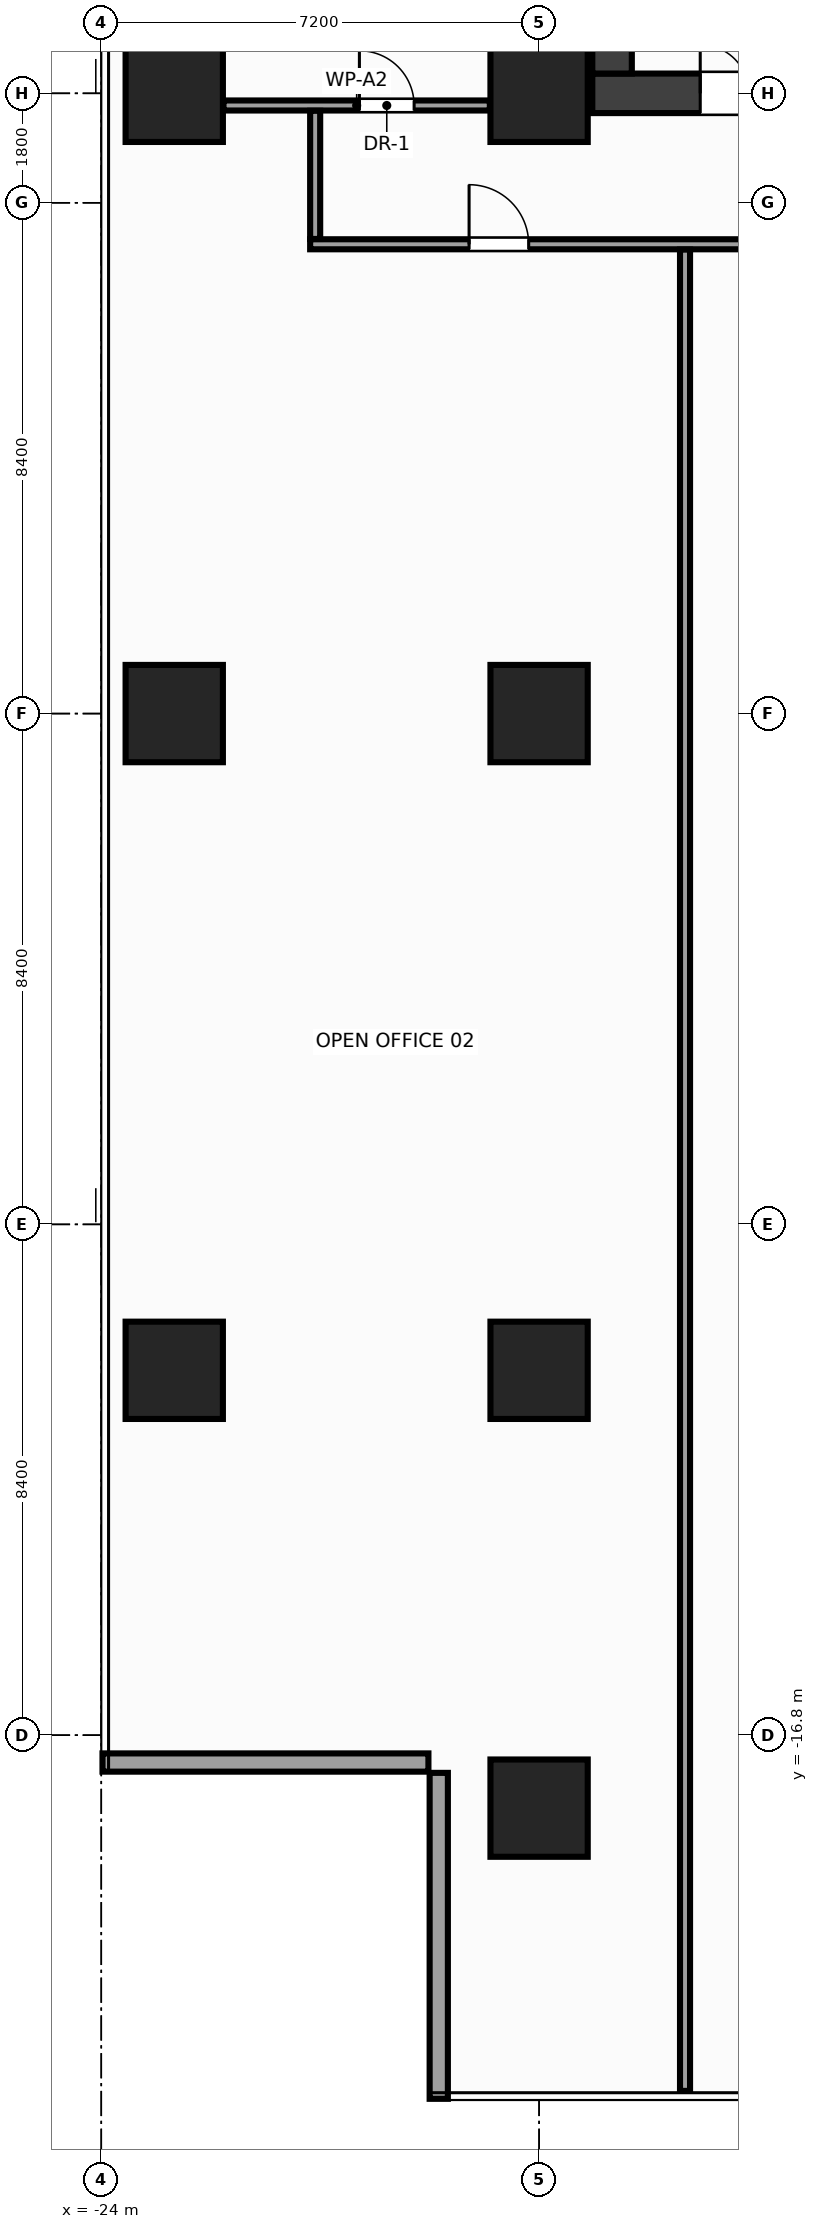
"""IFC4 building model, lengths in metres.
Left out: names, types, materials, properties, quantities, classifications, styles, units other than length and angle.
Written with IfcOpenShell. Run it as: python <this file> out.ifc"""

import sys

from ifc_helpers import new_model, si_unit, direction, frame, frame_2d, origin, origin_2d, place, context, subcontext, project, spatial, rectangle, extrude, source, transform, mapped, element, fill, save


model = new_model("IFC4")
c1 = context("Model", 3, precision=1e-05, world=origin(), true_north=direction((0.0, 1.0)))
c2 = subcontext(c1, "Body", "Model", "MODEL_VIEW")
j1 = project(units=[si_unit("LENGTHUNIT", "METRE"), si_unit("PLANEANGLEUNIT", "RADIAN")], contexts=[c1])
p1 = place(None, origin())
s1 = spatial("IfcSite", under=j1, at=p1, CompositionType="ELEMENT")
p2 = place(p1, origin())
s2 = spatial("IfcBuilding", under=s1, at=p2, CompositionType="ELEMENT")
p3 = place(p2, frame((0.0, 0.0, 160.4)))
s3 = spatial("IfcBuildingStorey", under=s2, at=p3, CompositionType="ELEMENT", Elevation=160.4)
m1 = source(origin(), c2, "Body", "SweptSolid", [
    extrude(rectangle(XDim=31.85, YDim=0.65, at=frame_2d((15.925, 0.0))), origin(), (0.0, 0.0, 1.0), 3.6),
])
p4 = place(p3, frame((-15.925, 10.2, 0.0), z_axis=(0.0, 0.0, 1.0), x_axis=(1.0, 0.0, 0.0)))
e1 = element("IfcWall", 1, at=p4, inside=s3, PredefinedType="SHEAR", context=c2, shape_type="MappedRepresentation", body=[
    mapped(m1, transform((0.0, 0.0, 0.0), x_axis=(1.0, 0.0, 0.0), y_axis=(0.0, 1.0, 0.0), z_axis=(0.0, 0.0, 1.0), scale=1.0)),
])
p5 = place(p4, frame((1.775, 0.0, 0.0)))
e2 = element("IfcOpeningElement", 2, at=p5, cuts=e1, PredefinedType="OPENING", context=c2, shape_type="SweptSolid", body=[
    extrude(rectangle(XDim=1.6, YDim=2.15, at=frame_2d((0.8, 1.075))), frame((0.0, 0.337, 0.0), z_axis=(0.0, -1.0, 0.0), x_axis=(1.0, 0.0, 0.0)), (0.0, 0.0, 1.0), 0.674),
])
p6 = place(p4, frame((28.475, 0.0, 0.0)))
e3 = element("IfcOpeningElement", 3, at=p6, cuts=e1, PredefinedType="OPENING", context=c2, shape_type="SweptSolid", body=[
    extrude(rectangle(XDim=1.6, YDim=2.15, at=frame_2d((0.8, 1.075))), frame((0.0, 0.337, 0.0), z_axis=(0.0, -1.0, 0.0), x_axis=(1.0, 0.0, 0.0)), (0.0, 0.0, 1.0), 0.674),
])
p7 = place(p4, frame((15.175, 0.0, 0.0)))
e4 = element("IfcOpeningElement", 4, at=p7, cuts=e1, PredefinedType="OPENING", context=c2, shape_type="SweptSolid", body=[
    extrude(rectangle(XDim=1.5, YDim=2.2, at=frame_2d((0.75, 1.1))), frame((0.0, 0.337, 0.0), z_axis=(0.0, -1.0, 0.0), x_axis=(1.0, 0.0, 0.0)), (0.0, 0.0, 1.0), 0.674),
])
m2 = source(origin(), c2, "Body", "SweptSolid", [
    extrude(rectangle(XDim=12.95, YDim=0.65, at=frame_2d((6.475, 0.0))), origin(), (0.0, 0.0, 1.0), 3.6),
])
p8 = place(p3, frame((-15.6, 10.525, 0.0), z_axis=(0.0, 0.0, 1.0), x_axis=(0.0, 1.0, 0.0)))
e5 = element("IfcWall", 5, at=p8, inside=s3, PredefinedType="SHEAR", context=c2, shape_type="MappedRepresentation", body=[
    mapped(m2, transform((0.0, 0.0, 0.0), x_axis=(1.0, 0.0, 0.0), y_axis=(0.0, 1.0, 0.0), z_axis=(0.0, 0.0, 1.0), scale=1.0)),
])
m3 = source(origin(), c2, "Body", "SweptSolid", [
    extrude(rectangle(XDim=1.6, YDim=1.6, at=origin_2d()), origin(), (0.0, 0.0, 1.0), 3.6),
])
for number, where, z_axis, x_axis in (
    (6, (-16.8, -18.0, 0.0), (0.0, 0.0, 1.0), (1.0, 0.0, 0.0)),
    (7, (-16.8, -10.8, 0.0), (0.0, 0.0, 1.0), (1.0, 0.0, 0.0)),
    (8, (-16.8, 0.0, 0.0), (0.0, 0.0, 1.0), (1.0, 0.0, 0.0)),
    (9, (-16.8, 10.2, 0.0), (0.0, 0.0, 1.0), (1.0, 0.0, 0.0)),
    (10, (-22.8, -10.8, 0.0), (0.0, 0.0, 1.0), (1.0, 0.0, 0.0)),
    (11, (-22.8, 0.0, 0.0), (0.0, 0.0, 1.0), (1.0, 0.0, 0.0)),
    (12, (-22.8, 10.2, 0.0), (0.0, 0.0, 1.0), (1.0, 0.0, 0.0)),
):
    element("IfcColumn", number, at=place(p3, frame(where, z_axis=z_axis, x_axis=x_axis)), inside=s3, PredefinedType="COLUMN", context=c2, shape_type="MappedRepresentation", body=[
        mapped(m3, transform((0.0, 0.0, 0.0), x_axis=(1.0, 0.0, 0.0), y_axis=(0.0, 1.0, 0.0), z_axis=(0.0, 0.0, 1.0), scale=1.0)),
    ])
m4 = source(origin(), c2, "Body", "SweptSolid", [
    extrude(rectangle(XDim=5.36, YDim=0.3, at=frame_2d((2.68, 0.0))), origin(), (0.0, 0.0, 1.0), 2.76),
])
p9 = place(p3, frame((-23.98, -17.25, 0.0), z_axis=(0.0, 0.0, 1.0), x_axis=(1.0, 0.0, 0.0)))
e13 = element("IfcWall", 13, at=p9, inside=s3, PredefinedType="STANDARD", context=c2, shape_type="MappedRepresentation", body=[
    mapped(m4, transform((0.0, 0.0, 0.0), x_axis=(1.0, 0.0, 0.0), y_axis=(0.0, 1.0, 0.0), z_axis=(0.0, 0.0, 1.0), scale=1.0)),
])
m5 = source(origin(), c2, "Body", "SweptSolid", [
    extrude(rectangle(XDim=5.36, YDim=0.3, at=frame_2d((2.68, 0.0))), origin(), (0.0, 0.0, 1.0), 2.76),
])
p10 = place(p3, frame((-18.45, -17.42, 0.0), z_axis=(0.0, 0.0, 1.0), x_axis=(0.0, -1.0, 0.0)))
e14 = element("IfcWall", 14, at=p10, inside=s3, PredefinedType="STANDARD", context=c2, shape_type="MappedRepresentation", body=[
    mapped(m5, transform((0.0, 0.0, 0.0), x_axis=(1.0, 0.0, 0.0), y_axis=(0.0, 1.0, 0.0), z_axis=(0.0, 0.0, 1.0), scale=1.0)),
])
m6 = source(origin(), c2, "Body", "SweptSolid", [
    extrude(rectangle(XDim=4.38, YDim=0.165, at=frame_2d((2.19, 0.0))), origin(), (0.0, 0.0, 1.0), 2.915),
])
p11 = place(p3, frame((-21.99, 10.0, 0.0), z_axis=(0.0, 0.0, 1.0), x_axis=(1.0, 0.0, 0.0)))
e15 = element("IfcWall", 15, at=p11, inside=s3, PredefinedType="PARTITIONING", context=c2, shape_type="MappedRepresentation", body=[
    mapped(m6, transform((0.0, 0.0, 0.0), x_axis=(1.0, 0.0, 0.0), y_axis=(0.0, 1.0, 0.0), z_axis=(0.0, 0.0, 1.0), scale=1.0)),
])
p12 = place(p11, frame((2.235, 0.0, 0.0)))
e16 = element("IfcOpeningElement", 16, at=p12, cuts=e15, PredefinedType="OPENING", context=c2, shape_type="SweptSolid", body=[
    extrude(rectangle(XDim=0.9, YDim=2.15, at=frame_2d((0.45, 1.075))), frame((0.0, 0.094, 0.0), z_axis=(0.0, -1.0, 0.0), x_axis=(1.0, 0.0, 0.0)), (0.0, 0.0, 1.0), 0.189),
])
m7 = source(origin(), c2, "Body", "SweptSolid", [
    extrude(rectangle(XDim=31.6, YDim=0.165, at=frame_2d((15.8, 0.0))), origin(), (0.0, 0.0, 1.0), 2.765),
])
p13 = place(p3, frame((-20.565, 7.718, 0.0), z_axis=(0.0, 0.0, 1.0), x_axis=(1.0, 0.0, 0.0)))
e17 = element("IfcWall", 17, at=p13, inside=s3, PredefinedType="PARTITIONING", context=c2, shape_type="MappedRepresentation", body=[
    mapped(m7, transform((0.0, 0.0, 0.0), x_axis=(1.0, 0.0, 0.0), y_axis=(0.0, 1.0, 0.0), z_axis=(0.0, 0.0, 1.0), scale=1.0)),
])
p14 = place(p13, frame((2.614, 0.0, 0.0)))
e18 = element("IfcOpeningElement", 18, at=p14, cuts=e17, PredefinedType="OPENING", context=c2, shape_type="SweptSolid", body=[
    extrude(rectangle(XDim=0.98, YDim=2.15, at=frame_2d((0.49, 1.075))), frame((0.0, 0.094, 0.0), z_axis=(0.0, -1.0, 0.0), x_axis=(1.0, 0.0, 0.0)), (0.0, 0.0, 1.0), 0.189),
])
p15 = place(p13, frame((15.175, 0.0, 0.0)))
e19 = element("IfcOpeningElement", 19, at=p15, cuts=e17, PredefinedType="OPENING", context=c2, shape_type="SweptSolid", body=[
    extrude(rectangle(XDim=0.98, YDim=2.15, at=frame_2d((0.49, 1.075))), frame((0.0, 0.094, 0.0), z_axis=(0.0, -1.0, 0.0), x_axis=(1.0, 0.0, 0.0)), (0.0, 0.0, 1.0), 0.189),
])
p16 = place(p13, frame((27.874, 0.0, 0.0)))
e20 = element("IfcOpeningElement", 20, at=p16, cuts=e17, PredefinedType="OPENING", context=c2, shape_type="SweptSolid", body=[
    extrude(rectangle(XDim=0.98, YDim=2.15, at=frame_2d((0.49, 1.075))), frame((0.0, 0.094, 0.0), z_axis=(0.0, -1.0, 0.0), x_axis=(1.0, 0.0, 0.0)), (0.0, 0.0, 1.0), 0.189),
])
m8 = source(origin(), c2, "Body", "SweptSolid", [
    extrude(rectangle(XDim=2.108, YDim=0.165, at=frame_2d((1.054, 0.0))), origin(), (0.0, 0.0, 1.0), 3.38),
])
p17 = place(p3, frame((-20.482, 7.805, 0.0), z_axis=(0.0, 0.0, 1.0), x_axis=(0.0, 1.0, 0.0)))
e21 = element("IfcWall", 21, at=p17, inside=s3, PredefinedType="PARTITIONING", context=c2, shape_type="MappedRepresentation", body=[
    mapped(m8, transform((0.0, 0.0, 0.0), x_axis=(1.0, 0.0, 0.0), y_axis=(0.0, 1.0, 0.0), z_axis=(0.0, 0.0, 1.0), scale=1.0)),
])
m9 = source(origin(), c2, "Body", "SweptSolid", [
    extrude(rectangle(XDim=30.28, YDim=0.165, at=frame_2d((15.14, 0.0))), origin(), (0.0, 0.0, 1.0), 2.665),
])
p18 = place(p3, frame((-14.4, -22.65, 0.0), z_axis=(0.0, 0.0, 1.0), x_axis=(0.0, 1.0, 0.0)))
e22 = element("IfcWall", 22, at=p18, inside=s3, PredefinedType="PARTITIONING", context=c2, shape_type="MappedRepresentation", body=[
    mapped(m9, transform((0.0, 0.0, 0.0), x_axis=(1.0, 0.0, 0.0), y_axis=(0.0, 1.0, 0.0), z_axis=(0.0, 0.0, 1.0), scale=1.0)),
])
m10 = source(origin(), c2, "Body", "SweptSolid", [
    extrude(rectangle(XDim=1.6, YDim=2.15, at=frame_2d((0.8, 1.075))), frame((0.0, 0.025, 0.0), z_axis=(0.0, -1.0, 0.0), x_axis=(1.0, 0.0, 0.0)), (0.0, 0.0, 1.0), 0.05),
])
p19 = place(p5, origin())
e23 = element("IfcDoor", 23, at=p19, inside=s3, OperationType="DOUBLE_DOOR_SINGLE_SWING", PredefinedType="DOOR", context=c2, shape_type="MappedRepresentation", body=[
    mapped(m10, transform((0.0, 0.0, 0.0), x_axis=(1.0, 0.0, 0.0), y_axis=(0.0, 1.0, 0.0), z_axis=(0.0, 0.0, 1.0), scale=1.0)),
])
fill(e2, e23)
m11 = source(origin(), c2, "Body", "SweptSolid", [
    extrude(rectangle(XDim=0.9, YDim=2.15, at=frame_2d((0.45, 1.075))), frame((0.0, 0.025, 0.0), z_axis=(0.0, -1.0, 0.0), x_axis=(1.0, 0.0, 0.0)), (0.0, 0.0, 1.0), 0.05),
])
p20 = place(p12, origin())
e24 = element("IfcDoor", 24, at=p20, inside=s3, OperationType="SINGLE_SWING_LEFT", PredefinedType="DOOR", context=c2, shape_type="MappedRepresentation", body=[
    mapped(m11, transform((0.0, 0.0, 0.0), x_axis=(1.0, 0.0, 0.0), y_axis=(0.0, 1.0, 0.0), z_axis=(0.0, 0.0, 1.0), scale=1.0)),
])
fill(e16, e24)
m12 = source(origin(), c2, "Body", "SweptSolid", [
    extrude(rectangle(XDim=0.98, YDim=2.15, at=frame_2d((0.49, 1.075))), frame((0.0, 0.025, 0.0), z_axis=(0.0, -1.0, 0.0), x_axis=(1.0, 0.0, 0.0)), (0.0, 0.0, 1.0), 0.05),
])
p21 = place(p14, origin())
e25 = element("IfcDoor", 25, at=p21, inside=s3, OperationType="SINGLE_SWING_LEFT", PredefinedType="DOOR", context=c2, shape_type="MappedRepresentation", body=[
    mapped(m12, transform((0.0, 0.0, 0.0), x_axis=(1.0, 0.0, 0.0), y_axis=(0.0, 1.0, 0.0), z_axis=(0.0, 0.0, 1.0), scale=1.0)),
])
fill(e18, e25)
save(model, sys.argv[1])
